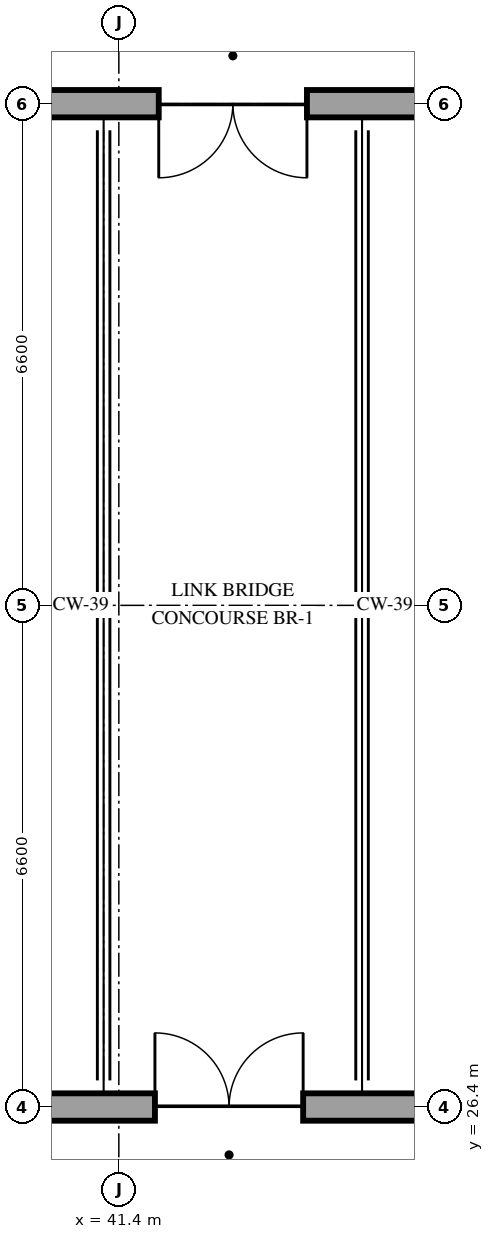
"""IFC4 building model, lengths in metres.
Left out: names, types, materials, properties, quantities, classifications, styles, units other than length and angle.
Written with IfcOpenShell. Run it as: python <this file> out.ifc"""

import sys

from ifc_helpers import new_model, si_unit, direction, frame, frame_2d, origin, place, context, subcontext, project, spatial, rectangle, extrude, element, fill, save


model = new_model("IFC4")
c1 = context("Model", 3, precision=1e-05, world=origin(), true_north=direction((0.0, 1.0)))
c2 = subcontext(c1, "Body", "Model", "MODEL_VIEW")
j1 = project(units=[si_unit("LENGTHUNIT", "METRE"), si_unit("PLANEANGLEUNIT", "RADIAN")], contexts=[c1])
p1 = place(None, origin())
s1 = spatial("IfcSite", under=j1, at=p1, CompositionType="ELEMENT")
p2 = place(p1, origin())
s2 = spatial("IfcBuilding", under=s1, at=p2, CompositionType="ELEMENT")
p3 = place(p2, frame((0.0, 0.0, 5.4)))
s3 = spatial("IfcBuildingStorey", under=s2, at=p3, CompositionType="ELEMENT", Elevation=5.4)
p4 = place(p3, frame((39.825, 26.4, 0.0), z_axis=(0.0, 0.0, 1.0), x_axis=(1.0, 0.0, 0.0)))
e1 = element("IfcWall", 1, at=p4, inside=s3, PredefinedType="STANDARD", context=c2, shape_type="SweptSolid", body=[
    extrude(rectangle(XDim=6.05, YDim=0.36, at=frame_2d((3.025, 0.0))), origin(), (0.0, 0.0, 1.0), 3.95),
])
p5 = place(p4, frame((2.05, 0.0, 0.0)))
e2 = element("IfcOpeningElement", 2, at=p5, cuts=e1, PredefinedType="OPENING", context=c2, shape_type="SweptSolid", body=[
    extrude(rectangle(XDim=1.95, YDim=2.35, at=frame_2d((0.975, 1.175))), frame((0.0, 0.195, 0.0), z_axis=(0.0, -1.0, 0.0), x_axis=(1.0, 0.0, 0.0)), (0.0, 0.0, 1.0), 0.39),
])
p6 = place(p3, frame((45.805, 39.6, 0.0), z_axis=(0.0, 0.0, 1.0), x_axis=(-1.0, 0.0, 0.0)))
e3 = element("IfcWall", 3, at=p6, inside=s3, PredefinedType="STANDARD", context=c2, shape_type="SweptSolid", body=[
    extrude(rectangle(XDim=5.81, YDim=0.36, at=frame_2d((2.905, 0.0))), origin(), (0.0, 0.0, 1.0), 3.36),
])
p7 = place(p6, frame((1.93, 0.0, 0.0)))
e4 = element("IfcOpeningElement", 4, at=p7, cuts=e3, PredefinedType="OPENING", context=c2, shape_type="SweptSolid", body=[
    extrude(rectangle(XDim=1.95, YDim=2.35, at=frame_2d((0.975, 1.175))), frame((0.0, 0.195, 0.0), z_axis=(0.0, -1.0, 0.0), x_axis=(1.0, 0.0, 0.0)), (0.0, 0.0, 1.0), 0.39),
])
p8 = place(p5, origin())
e5 = element("IfcDoor", 5, at=p8, inside=s3, OperationType="DOUBLE_DOOR_SINGLE_SWING", PredefinedType="DOOR", context=c2, shape_type="SweptSolid", body=[
    extrude(rectangle(XDim=1.95, YDim=2.35, at=frame_2d((0.975, 1.175))), frame((0.0, 0.025, 0.0), z_axis=(0.0, -1.0, 0.0), x_axis=(1.0, 0.0, 0.0)), (0.0, 0.0, 1.0), 0.05),
])
fill(e2, e5)
p9 = place(p7, origin())
e6 = element("IfcDoor", 6, at=p9, inside=s3, OperationType="DOUBLE_DOOR_SINGLE_SWING", PredefinedType="DOOR", context=c2, shape_type="SweptSolid", body=[
    extrude(rectangle(XDim=1.95, YDim=2.35, at=frame_2d((0.975, 1.175))), frame((0.0, 0.025, 0.0), z_axis=(0.0, -1.0, 0.0), x_axis=(1.0, 0.0, 0.0)), (0.0, 0.0, 1.0), 0.05),
])
fill(e4, e6)
save(model, sys.argv[1])
